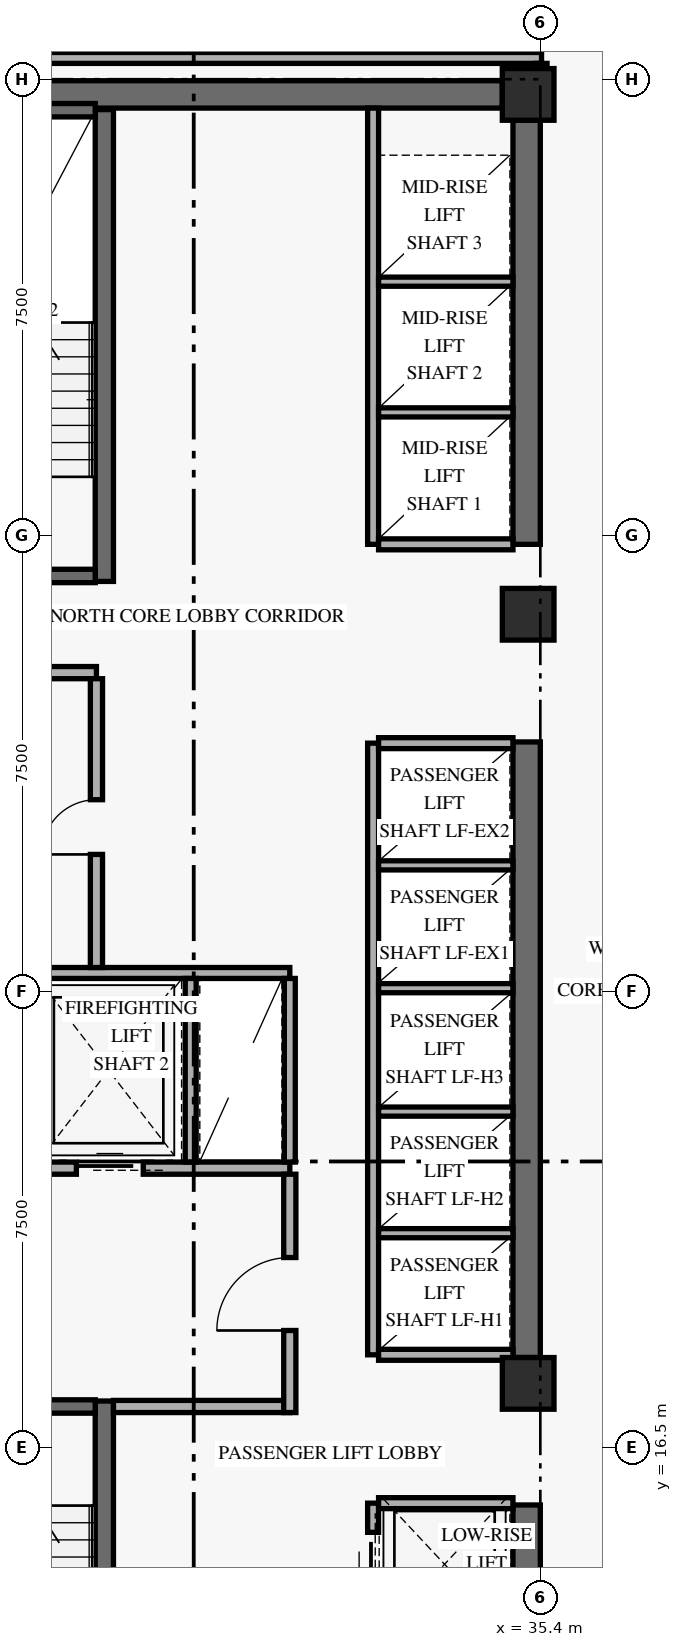
"""IFC4 building model, lengths in metres.
Left out: names, types, materials, properties, quantities, classifications, styles, units other than length and angle.
Written with IfcOpenShell. Run it as: python <this file> out.ifc"""

import sys

from ifc_helpers import new_model, si_unit, direction, frame, frame_2d, origin, origin_2d, place, context, subcontext, project, spatial, rectangle, extrude, element, fill, save


model = new_model("IFC4")
c1 = context("Model", 3, precision=1e-05, world=origin(), true_north=direction((0.0, 1.0)))
c2 = subcontext(c1, "Body", "Model", "MODEL_VIEW")
j1 = project(units=[si_unit("LENGTHUNIT", "METRE"), si_unit("PLANEANGLEUNIT", "RADIAN")], contexts=[c1])
p1 = place(None, origin())
s1 = spatial("IfcSite", under=j1, at=p1, CompositionType="ELEMENT")
p2 = place(p1, origin())
s2 = spatial("IfcBuilding", under=s1, at=p2, CompositionType="ELEMENT")
p3 = place(p2, frame((0.0, 0.0, 84.0)))
s3 = spatial("IfcBuildingStorey", under=s2, at=p3, CompositionType="ELEMENT", Elevation=84.0)
p4 = place(p3, frame((35.175, 9.675, 0.0), z_axis=(0.0, 0.0, 1.0), x_axis=(0.0, 1.0, 0.0)))
e1 = element("IfcWall", 1, at=p4, inside=s3, PredefinedType="SHEAR", context=c2, shape_type="SweptSolid", body=[
    extrude(rectangle(XDim=5.875, YDim=0.45, at=frame_2d((2.938, 0.0))), origin(), (0.0, 0.0, 1.0), 2.749),
])
p5 = place(p3, frame((35.175, 17.975, 0.0), z_axis=(0.0, 0.0, 1.0), x_axis=(0.0, 1.0, 0.0)))
e2 = element("IfcWall", 2, at=p5, inside=s3, PredefinedType="SHEAR", context=c2, shape_type="SweptSolid", body=[
    extrude(rectangle(XDim=10.125, YDim=0.45, at=frame_2d((5.062, 0.0))), origin(), (0.0, 0.0, 1.0), 2.749),
])
p6 = place(p3, frame((35.175, 31.35, 0.0), z_axis=(0.0, 0.0, 1.0), x_axis=(0.0, 1.0, 0.0)))
e3 = element("IfcWall", 3, at=p6, inside=s3, PredefinedType="SHEAR", context=c2, shape_type="SweptSolid", body=[
    extrude(rectangle(XDim=6.975, YDim=0.45, at=frame_2d((3.487, 0.0))), origin(), (0.0, 0.0, 1.0), 2.749),
])
p7 = place(p3, frame((24.625, 38.75, 0.0), z_axis=(0.0, 0.0, 1.0), x_axis=(1.0, 0.0, 0.0)))
e4 = element("IfcWall", 4, at=p7, inside=s3, PredefinedType="SHEAR", context=c2, shape_type="SweptSolid", body=[
    extrude(rectangle(XDim=10.15, YDim=0.45, at=frame_2d((5.075, 0.0))), origin(), (0.0, 0.0, 1.0), 3.36),
])
p8 = place(p3, frame((28.23, 9.5, 0.0), z_axis=(0.0, 0.0, 1.0), x_axis=(0.0, 1.0, 0.0)))
e5 = element("IfcWall", 5, at=p8, inside=s3, PredefinedType="SHEAR", context=c2, shape_type="SweptSolid", body=[
    extrude(rectangle(XDim=7.76, YDim=0.3, at=frame_2d((3.88, 0.0))), origin(), (0.0, 0.0, 1.0), 3.36),
])
p9 = place(p3, frame((24.92, 17.17, 0.0), z_axis=(0.0, 0.0, 1.0), x_axis=(1.0, 0.0, 0.0)))
e6 = element("IfcWall", 6, at=p9, inside=s3, PredefinedType="SHEAR", context=c2, shape_type="SweptSolid", body=[
    extrude(rectangle(XDim=3.16, YDim=0.22, at=frame_2d((1.58, 0.0))), origin(), (0.0, 0.0, 1.0), 3.36),
])
p10 = place(p9, frame((0.78, 0.0, 0.0)))
e7 = element("IfcOpeningElement", 7, at=p10, cuts=e6, PredefinedType="OPENING", context=c2, shape_type="SweptSolid", body=[
    extrude(rectangle(XDim=1.05, YDim=2.15, at=frame_2d((0.525, 1.075))), frame((0.0, 0.12, 0.0), z_axis=(0.0, -1.0, 0.0), x_axis=(1.0, 0.0, 0.0)), (0.0, 0.0, 1.0), 0.24),
])
p11 = place(p3, frame((28.23, 30.74, 0.0), z_axis=(0.0, 0.0, 1.0), x_axis=(0.0, 1.0, 0.0)))
e8 = element("IfcWall", 8, at=p11, inside=s3, PredefinedType="SHEAR", context=c2, shape_type="SweptSolid", body=[
    extrude(rectangle(XDim=7.76, YDim=0.3, at=frame_2d((3.88, 0.0))), origin(), (0.0, 0.0, 1.0), 3.36),
])
p12 = place(p3, frame((24.92, 30.83, 0.0), z_axis=(0.0, 0.0, 1.0), x_axis=(1.0, 0.0, 0.0)))
e9 = element("IfcWall", 9, at=p12, inside=s3, PredefinedType="SHEAR", context=c2, shape_type="SweptSolid", body=[
    extrude(rectangle(XDim=3.16, YDim=0.22, at=frame_2d((1.58, 0.0))), origin(), (0.0, 0.0, 1.0), 3.36),
])
p13 = place(p12, frame((0.78, 0.0, 0.0)))
e10 = element("IfcOpeningElement", 10, at=p13, cuts=e9, PredefinedType="OPENING", context=c2, shape_type="SweptSolid", body=[
    extrude(rectangle(XDim=1.05, YDim=2.15, at=frame_2d((0.525, 1.075))), frame((0.0, 0.12, 0.0), z_axis=(0.0, -1.0, 0.0), x_axis=(1.0, 0.0, 0.0)), (0.0, 0.0, 1.0), 0.24),
])
p14 = place(p3, frame((24.92, 38.49, 0.0), z_axis=(0.0, 0.0, 1.0), x_axis=(1.0, 0.0, 0.0)))
e11 = element("IfcWall", 11, at=p14, inside=s3, PredefinedType="SHEAR", context=c2, shape_type="SweptSolid", body=[
    extrude(rectangle(XDim=3.16, YDim=0.22, at=frame_2d((1.58, 0.0))), origin(), (0.0, 0.0, 1.0), 3.36),
])
for number, where, z_axis, x_axis in (
    (12, (35.2, 17.55, 0.0), (0.0, 0.0, 1.0), (1.0, 0.0, 0.0)),
    (13, (35.2, 30.2, 0.0), (0.0, 0.0, 1.0), (1.0, 0.0, 0.0)),
    (14, (35.2, 38.75, 0.0), (0.0, 0.0, 1.0), (1.0, 0.0, 0.0)),
):
    element("IfcColumn", number, at=place(p3, frame(where, z_axis=z_axis, x_axis=x_axis)), inside=s3, PredefinedType="COLUMN", context=c2, shape_type="SweptSolid", body=[
        extrude(rectangle(XDim=0.85, YDim=0.85, at=origin_2d()), origin(), (0.0, 0.0, 1.0), 3.6),
    ])
p15 = place(p3, frame((24.45, 21.09, 0.0), z_axis=(0.0, 0.0, 1.0), x_axis=(1.0, 0.0, 0.0)))
e15 = element("IfcWall", 15, at=p15, inside=s3, PredefinedType="STANDARD", context=c2, shape_type="SweptSolid", body=[
    extrude(rectangle(XDim=6.83, YDim=0.2, at=frame_2d((3.415, 0.0))), origin(), (0.0, 0.0, 1.0), 3.36),
])
p16 = place(p15, frame((0.72, 0.0, 0.0)))
e16 = element("IfcOpeningElement", 16, at=p16, cuts=e15, PredefinedType="OPENING", context=c2, shape_type="SweptSolid", body=[
    extrude(rectangle(XDim=1.1, YDim=2.2, at=frame_2d((0.55, 1.1))), frame((0.0, 0.11, 0.0), z_axis=(0.0, -1.0, 0.0), x_axis=(1.0, 0.0, 0.0)), (0.0, 0.0, 1.0), 0.22),
])
p17 = place(p15, frame((3.32, 0.0, 0.0)))
e17 = element("IfcOpeningElement", 17, at=p17, cuts=e15, PredefinedType="OPENING", context=c2, shape_type="SweptSolid", body=[
    extrude(rectangle(XDim=1.1, YDim=2.2, at=frame_2d((0.55, 1.1))), frame((0.0, 0.11, 0.0), z_axis=(0.0, -1.0, 0.0), x_axis=(1.0, 0.0, 0.0)), (0.0, 0.0, 1.0), 0.22),
])
p18 = place(p3, frame((28.38, 17.17, 0.0), z_axis=(0.0, 0.0, 1.0), x_axis=(1.0, 0.0, 0.0)))
e18 = element("IfcWall", 18, at=p18, inside=s3, PredefinedType="STANDARD", context=c2, shape_type="SweptSolid", body=[
    extrude(rectangle(XDim=2.9, YDim=0.2, at=frame_2d((1.45, 0.0))), origin(), (0.0, 0.0, 1.0), 3.36),
])
p19 = place(p3, frame((31.28, 17.07, 0.0), z_axis=(0.0, 0.0, 1.0), x_axis=(0.0, 1.0, 0.0)))
e19 = element("IfcWall", 19, at=p19, inside=s3, PredefinedType="STANDARD", context=c2, shape_type="SweptSolid", body=[
    extrude(rectangle(XDim=3.92, YDim=0.2, at=frame_2d((1.96, 0.0))), origin(), (0.0, 0.0, 1.0), 2.731),
])
p20 = place(p19, frame((1.35, 0.0, 0.0)))
e20 = element("IfcOpeningElement", 20, at=p20, cuts=e19, PredefinedType="OPENING", context=c2, shape_type="SweptSolid", body=[
    extrude(rectangle(XDim=1.2, YDim=2.15, at=frame_2d((0.6, 1.075))), frame((0.0, 0.11, 0.0), z_axis=(0.0, -1.0, 0.0), x_axis=(1.0, 0.0, 0.0)), (0.0, 0.0, 1.0), 0.22),
])
p21 = place(p3, frame((24.45, 24.3, 0.0), z_axis=(0.0, 0.0, 1.0), x_axis=(1.0, 0.0, 0.0)))
e21 = element("IfcWall", 21, at=p21, inside=s3, PredefinedType="STANDARD", context=c2, shape_type="SweptSolid", body=[
    extrude(rectangle(XDim=6.83, YDim=0.18, at=frame_2d((3.415, 0.0))), origin(), (0.0, 0.0, 1.0), 3.36),
])
for number, where, z_axis, x_axis in (
    (22, (29.65, 21.19, 0.0), (0.0, 0.0, 1.0), (0.0, 1.0, 0.0)),
    (23, (31.28, 21.19, 0.0), (0.0, 0.0, 1.0), (0.0, 1.0, 0.0)),
):
    element("IfcWall", number, at=place(p3, frame(where, z_axis=z_axis, x_axis=x_axis)), inside=s3, PredefinedType="STANDARD", context=c2, shape_type="SweptSolid", body=[
        extrude(rectangle(XDim=3.02, YDim=0.18, at=frame_2d((1.51, 0.0))), origin(), (0.0, 0.0, 1.0), 3.36),
    ])
p22 = place(p3, frame((24.45, 29.24, 0.0), z_axis=(0.0, 0.0, 1.0), x_axis=(1.0, 0.0, 0.0)))
e24 = element("IfcWall", 24, at=p22, inside=s3, PredefinedType="STANDARD", context=c2, shape_type="SweptSolid", body=[
    extrude(rectangle(XDim=3.65, YDim=0.2, at=frame_2d((1.825, 0.0))), origin(), (0.0, 0.0, 1.0), 3.36),
])
p23 = place(p3, frame((28.1, 24.39, 0.0), z_axis=(0.0, 0.0, 1.0), x_axis=(0.0, 1.0, 0.0)))
e25 = element("IfcWall", 25, at=p23, inside=s3, PredefinedType="STANDARD", context=c2, shape_type="SweptSolid", body=[
    extrude(rectangle(XDim=4.75, YDim=0.2, at=frame_2d((2.375, 0.0))), origin(), (0.0, 0.0, 1.0), 3.36),
])
p24 = place(p23, frame((1.86, 0.0, 0.0)))
e26 = element("IfcOpeningElement", 26, at=p24, cuts=e25, PredefinedType="OPENING", context=c2, shape_type="SweptSolid", body=[
    extrude(rectangle(XDim=0.9, YDim=2.1, at=frame_2d((0.45, 1.05))), frame((0.0, 0.11, 0.0), z_axis=(0.0, -1.0, 0.0), x_axis=(1.0, 0.0, 0.0)), (0.0, 0.0, 1.0), 0.22),
])
p25 = place(p3, frame((32.65, 9.5, 0.0), z_axis=(0.0, 0.0, 1.0), x_axis=(0.0, 1.0, 0.0)))
e27 = element("IfcWall", 27, at=p25, inside=s3, PredefinedType="STANDARD", context=c2, shape_type="SweptSolid", body=[
    extrude(rectangle(XDim=6.08, YDim=0.18, at=frame_2d((3.04, 0.0))), origin(), (0.0, 0.0, 1.0), 3.36),
])
p26 = place(p25, frame((0.55, 0.0, 0.0)))
e28 = element("IfcOpeningElement", 28, at=p26, cuts=e27, PredefinedType="OPENING", context=c2, shape_type="SweptSolid", body=[
    extrude(rectangle(XDim=1.05, YDim=2.2, at=frame_2d((0.525, 1.1))), frame((0.0, 0.1, 0.0), z_axis=(0.0, -1.0, 0.0), x_axis=(1.0, 0.0, 0.0)), (0.0, 0.0, 1.0), 0.2),
])
p27 = place(p25, frame((2.55, 0.0, 0.0)))
e29 = element("IfcOpeningElement", 29, at=p27, cuts=e27, PredefinedType="OPENING", context=c2, shape_type="SweptSolid", body=[
    extrude(rectangle(XDim=1.05, YDim=2.2, at=frame_2d((0.525, 1.1))), frame((0.0, 0.1, 0.0), z_axis=(0.0, -1.0, 0.0), x_axis=(1.0, 0.0, 0.0)), (0.0, 0.0, 1.0), 0.2),
])
p28 = place(p25, frame((4.55, 0.0, 0.0)))
e30 = element("IfcOpeningElement", 30, at=p28, cuts=e27, PredefinedType="OPENING", context=c2, shape_type="SweptSolid", body=[
    extrude(rectangle(XDim=1.05, YDim=2.2, at=frame_2d((0.525, 1.1))), frame((0.0, 0.1, 0.0), z_axis=(0.0, -1.0, 0.0), x_axis=(1.0, 0.0, 0.0)), (0.0, 0.0, 1.0), 0.2),
])
p29 = place(p3, frame((32.74, 15.58, 0.0), z_axis=(0.0, 0.0, 1.0), x_axis=(1.0, 0.0, 0.0)))
e31 = element("IfcWall", 31, at=p29, inside=s3, PredefinedType="STANDARD", context=c2, shape_type="SweptSolid", body=[
    extrude(rectangle(XDim=2.21, YDim=0.18, at=frame_2d((1.105, 0.0))), origin(), (0.0, 0.0, 1.0), 3.36),
])
p30 = place(p3, frame((32.65, 18.02, 0.0), z_axis=(0.0, 0.0, 1.0), x_axis=(0.0, 1.0, 0.0)))
e32 = element("IfcWall", 32, at=p30, inside=s3, PredefinedType="STANDARD", context=c2, shape_type="SweptSolid", body=[
    extrude(rectangle(XDim=10.06, YDim=0.18, at=frame_2d((5.03, 0.0))), origin(), (0.0, 0.0, 1.0), 3.36),
])
for number, where, z_axis, x_axis in (
    (33, (32.74, 18.02, 0.0), (0.0, 0.0, 1.0), (1.0, 0.0, 0.0)),
    (34, (32.74, 28.08, 0.0), (0.0, 0.0, 1.0), (1.0, 0.0, 0.0)),
):
    element("IfcWall", number, at=place(p3, frame(where, z_axis=z_axis, x_axis=x_axis)), inside=s3, PredefinedType="STANDARD", context=c2, shape_type="SweptSolid", body=[
        extrude(rectangle(XDim=2.21, YDim=0.18, at=frame_2d((1.105, 0.0))), origin(), (0.0, 0.0, 1.0), 3.36),
    ])
for number, where, z_axis, x_axis in (
    (35, (32.74, 20.02, 0.0), (0.0, 0.0, 1.0), (1.0, 0.0, 0.0)),
    (36, (32.74, 22.02, 0.0), (0.0, 0.0, 1.0), (1.0, 0.0, 0.0)),
    (37, (32.74, 24.05, 0.0), (0.0, 0.0, 1.0), (1.0, 0.0, 0.0)),
    (38, (32.74, 26.07, 0.0), (0.0, 0.0, 1.0), (1.0, 0.0, 0.0)),
):
    element("IfcWall", number, at=place(p3, frame(where, z_axis=z_axis, x_axis=x_axis)), inside=s3, PredefinedType="STANDARD", context=c2, shape_type="SweptSolid", body=[
        extrude(rectangle(XDim=2.21, YDim=0.15, at=frame_2d((1.105, 0.0))), origin(), (0.0, 0.0, 1.0), 3.36),
    ])
p31 = place(p3, frame((32.65, 31.35, 0.0), z_axis=(0.0, 0.0, 1.0), x_axis=(0.0, 1.0, 0.0)))
e39 = element("IfcWall", 39, at=p31, inside=s3, PredefinedType="STANDARD", context=c2, shape_type="SweptSolid", body=[
    extrude(rectangle(XDim=7.175, YDim=0.18, at=frame_2d((3.587, 0.0))), origin(), (0.0, 0.0, 1.0), 3.36),
])
p32 = place(p3, frame((32.74, 31.35, 0.0), z_axis=(0.0, 0.0, 1.0), x_axis=(1.0, 0.0, 0.0)))
e40 = element("IfcWall", 40, at=p32, inside=s3, PredefinedType="STANDARD", context=c2, shape_type="SweptSolid", body=[
    extrude(rectangle(XDim=2.21, YDim=0.18, at=frame_2d((1.105, 0.0))), origin(), (0.0, 0.0, 1.0), 3.36),
])
for number, where, z_axis, x_axis in (
    (41, (32.74, 33.52, 0.0), (0.0, 0.0, 1.0), (1.0, 0.0, 0.0)),
    (42, (32.74, 35.67, 0.0), (0.0, 0.0, 1.0), (1.0, 0.0, 0.0)),
):
    element("IfcWall", number, at=place(p3, frame(where, z_axis=z_axis, x_axis=x_axis)), inside=s3, PredefinedType="STANDARD", context=c2, shape_type="SweptSolid", body=[
        extrude(rectangle(XDim=2.21, YDim=0.15, at=frame_2d((1.105, 0.0))), origin(), (0.0, 0.0, 1.0), 3.36),
    ])
p33 = place(p3, frame((23.75, 39.35, 0.0), z_axis=(0.0, 0.0, 1.0), x_axis=(1.0, 0.0, 0.0)))
e43 = element("IfcWall", 43, at=p33, inside=s3, PredefinedType="STANDARD", context=c2, shape_type="SweptSolid", body=[
    extrude(rectangle(XDim=11.67, YDim=0.18, at=frame_2d((5.835, 0.0))), origin(), (0.0, 0.0, 1.0), 2.731),
])
p34 = place(p3, frame((35.42, 38.75, 0.0), z_axis=(0.0, 0.0, 1.0), x_axis=(0.0, 1.0, 0.0)))
e44 = element("IfcWall", 44, at=p34, inside=s3, PredefinedType="STANDARD", context=c2, shape_type="SweptSolid", body=[
    extrude(rectangle(XDim=0.51, YDim=0.18, at=frame_2d((0.255, 0.0))), origin(), (0.0, 0.0, 1.0), 2.731),
])
p35 = place(p17, origin())
e45 = element("IfcDoor", 45, at=p35, inside=s3, OperationType="SLIDING_TO_LEFT", PredefinedType="DOOR", context=c2, shape_type="SweptSolid", body=[
    extrude(rectangle(XDim=1.1, YDim=2.2, at=frame_2d((0.55, 1.1))), frame((0.0, 0.025, 0.0), z_axis=(0.0, -1.0, 0.0), x_axis=(1.0, 0.0, 0.0)), (0.0, 0.0, 1.0), 0.05),
])
fill(e17, e45)
p36 = place(p20, origin())
e46 = element("IfcDoor", 46, at=p36, inside=s3, OperationType="SINGLE_SWING_LEFT", PredefinedType="DOOR", context=c2, shape_type="SweptSolid", body=[
    extrude(rectangle(XDim=1.2, YDim=2.15, at=frame_2d((0.6, 1.075))), frame((0.0, 0.025, 0.0), z_axis=(0.0, -1.0, 0.0), x_axis=(1.0, 0.0, 0.0)), (0.0, 0.0, 1.0), 0.05),
])
fill(e20, e46)
p37 = place(p24, origin())
e47 = element("IfcDoor", 47, at=p37, inside=s3, OperationType="SINGLE_SWING_LEFT", PredefinedType="DOOR", context=c2, shape_type="SweptSolid", body=[
    extrude(rectangle(XDim=0.9, YDim=2.1, at=frame_2d((0.45, 1.05))), frame((0.0, 0.025, 0.0), z_axis=(0.0, -1.0, 0.0), x_axis=(1.0, 0.0, 0.0)), (0.0, 0.0, 1.0), 0.05),
])
fill(e26, e47)
p38 = place(p28, origin())
e48 = element("IfcDoor", 48, at=p38, inside=s3, OperationType="SLIDING_TO_LEFT", PredefinedType="DOOR", context=c2, shape_type="SweptSolid", body=[
    extrude(rectangle(XDim=1.05, YDim=2.2, at=frame_2d((0.525, 1.1))), frame((0.0, 0.025, 0.0), z_axis=(0.0, -1.0, 0.0), x_axis=(1.0, 0.0, 0.0)), (0.0, 0.0, 1.0), 0.05),
])
fill(e30, e48)
save(model, sys.argv[1])
